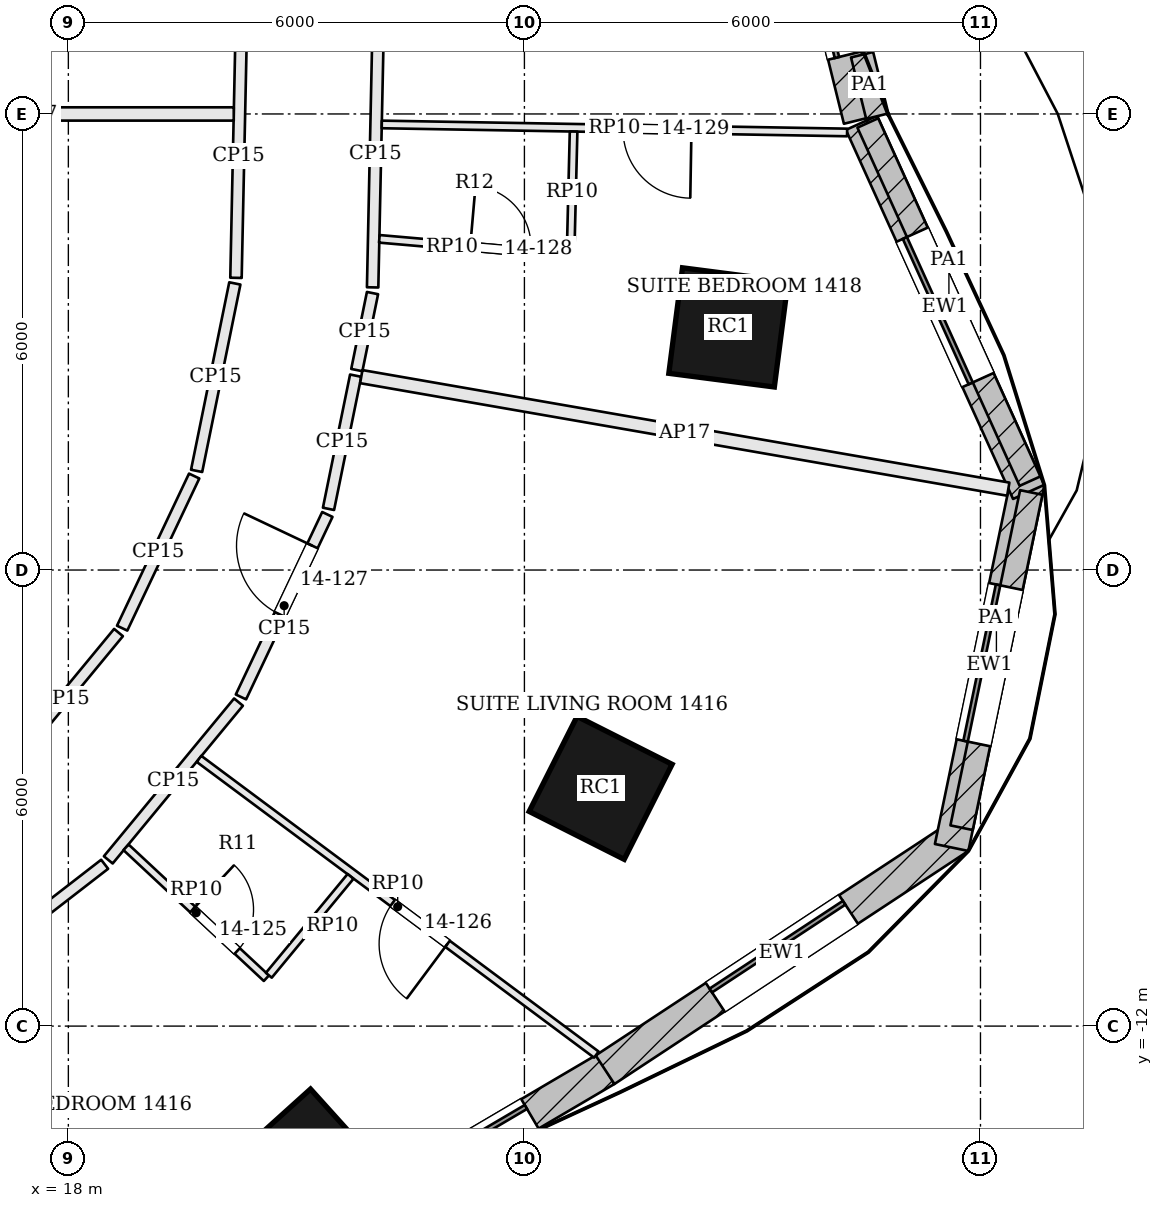
"""IFC4 building model, lengths in metres.
Left out: names, types, materials, properties, quantities, classifications, styles, units other than length and angle.
Written with IfcOpenShell. Run it as: python <this file> out.ifc"""

import sys

from ifc_helpers import new_model, si_unit, direction, frame, frame_2d, origin, origin_2d, place, context, subcontext, project, spatial, rectangle, extrude, element, fill, save


model = new_model("IFC4")
c1 = context("Model", 3, precision=1e-05, world=origin(), true_north=direction((0.0, 1.0)))
c2 = subcontext(c1, "Body", "Model", "MODEL_VIEW")
j1 = project(units=[si_unit("LENGTHUNIT", "METRE"), si_unit("PLANEANGLEUNIT", "RADIAN")], contexts=[c1])
p1 = place(None, origin())
s1 = spatial("IfcSite", under=j1, at=p1, CompositionType="ELEMENT")
p2 = place(p1, origin())
s2 = spatial("IfcBuilding", under=s1, at=p2, CompositionType="ELEMENT")
p3 = place(p2, frame((0.0, 0.0, 66.3)))
s3 = spatial("IfcBuildingStorey", under=s2, at=p3, CompositionType="ELEMENT", Elevation=66.3)
for number, where, z_axis, x_axis in (
    (1, (21.135, -13.817, 0.0), (0.0, 0.0, 1.0), (0.743, 0.67, 0.0)),
    (2, (25.003, -8.866, 0.0), (0.0, 0.0, 1.0), (0.45, 0.893, 0.0)),
    (3, (26.684, -2.808, 0.0), (0.0, 0.0, 1.0), (0.128, 0.992, 0.0)),
):
    element("IfcColumn", number, at=place(p3, frame(where, z_axis=z_axis, x_axis=x_axis)), inside=s3, PredefinedType="COLUMN", context=c2, shape_type="SweptSolid", body=[
        extrude(rectangle(XDim=1.4, YDim=1.4, at=origin_2d()), origin(), (0.0, 0.0, 1.0), 3.6),
    ])
p4 = place(p3, frame((28.422, -0.075, 0.0), z_axis=(0.0, 0.0, 1.0), x_axis=(-0.239809222807, 0.970820033094, 0.0)))
e4 = element("IfcWall", 4, at=p4, inside=s3, PredefinedType="SOLIDWALL", context=c2, shape_type="SweptSolid", body=[
    extrude(rectangle(XDim=3.836, YDim=0.45, at=frame_2d((1.918, 0.0))), origin(), (0.0, 0.0, 1.0), 3.4),
])
p5 = place(p4, frame((0.868, 0.0, 0.9)))
e5 = element("IfcOpeningElement", 5, at=p5, cuts=e4, PredefinedType="OPENING", context=c2, shape_type="SweptSolid", body=[
    extrude(rectangle(XDim=2.1, YDim=2.0, at=frame_2d((1.05, 1.0))), frame((0.0, 0.235, 0.0), z_axis=(0.0, -1.0, 0.0), x_axis=(1.0, 0.0, 0.0)), (0.0, 0.0, 1.0), 0.47),
])
p6 = place(p3, frame((21.266, -14.805, 0.0), z_axis=(0.0, 0.0, 1.0), x_axis=(0.861975457737, 0.506950007653, 0.0)))
e6 = element("IfcWall", 6, at=p6, inside=s3, PredefinedType="SOLIDWALL", context=c2, shape_type="SweptSolid", body=[
    extrude(rectangle(XDim=4.413, YDim=0.45, at=frame_2d((2.207, 0.0))), origin(), (0.0, 0.0, 1.0), 3.4),
])
p7 = place(p6, frame((1.156, 0.0, 0.9)))
e7 = element("IfcOpeningElement", 7, at=p7, cuts=e6, PredefinedType="OPENING", context=c2, shape_type="SweptSolid", body=[
    extrude(rectangle(XDim=2.1, YDim=2.0, at=frame_2d((1.05, 1.0))), frame((0.0, 0.235, 0.0), z_axis=(0.0, -1.0, 0.0), x_axis=(1.0, 0.0, 0.0)), (0.0, 0.0, 1.0), 0.47),
])
p8 = place(p3, frame((25.061, -12.574, 0.0), z_axis=(0.0, 0.0, 1.0), x_axis=(0.83520622102, 0.549936876714, 0.0)))
e8 = element("IfcWall", 8, at=p8, inside=s3, PredefinedType="SOLIDWALL", context=c2, shape_type="SweptSolid", body=[
    extrude(rectangle(XDim=5.57, YDim=0.45, at=frame_2d((2.785, 0.0))), origin(), (0.0, 0.0, 1.0), 3.4),
])
p9 = place(p8, frame((1.735, 0.0, 0.9)))
e9 = element("IfcOpeningElement", 9, at=p9, cuts=e8, PredefinedType="OPENING", context=c2, shape_type="SweptSolid", body=[
    extrude(rectangle(XDim=2.1, YDim=2.0, at=frame_2d((1.05, 1.0))), frame((0.0, 0.235, 0.0), z_axis=(0.0, -1.0, 0.0), x_axis=(1.0, 0.0, 0.0)), (0.0, 0.0, 1.0), 0.47),
])
p10 = place(p3, frame((29.621, -9.65, 0.0), z_axis=(0.0, 0.0, 1.0), x_axis=(0.203505836306, 0.979073732969, 0.0)))
e10 = element("IfcWall", 10, at=p10, inside=s3, PredefinedType="SOLIDWALL", context=c2, shape_type="SweptSolid", body=[
    extrude(rectangle(XDim=4.914, YDim=0.45, at=frame_2d((2.457, 0.0))), origin(), (0.0, 0.0, 1.0), 3.4),
])
p11 = place(p10, frame((1.407, 0.0, 0.9)))
e11 = element("IfcOpeningElement", 11, at=p11, cuts=e10, PredefinedType="OPENING", context=c2, shape_type="SweptSolid", body=[
    extrude(rectangle(XDim=2.1, YDim=2.0, at=frame_2d((1.05, 1.0))), frame((0.0, 0.235, 0.0), z_axis=(0.0, -1.0, 0.0), x_axis=(1.0, 0.0, 0.0)), (0.0, 0.0, 1.0), 0.47),
])
p12 = place(p3, frame((30.634, -4.972, 0.0), z_axis=(0.0, 0.0, 1.0), x_axis=(-0.412494644758, 0.910960025493, 0.0)))
e12 = element("IfcWall", 12, at=p12, inside=s3, PredefinedType="SOLIDWALL", context=c2, shape_type="SweptSolid", body=[
    extrude(rectangle(XDim=5.33, YDim=0.45, at=frame_2d((2.665, 0.0))), origin(), (0.0, 0.0, 1.0), 3.4),
])
p13 = place(p12, frame((1.615, 0.0, 0.9)))
e13 = element("IfcOpeningElement", 13, at=p13, cuts=e12, PredefinedType="OPENING", context=c2, shape_type="SweptSolid", body=[
    extrude(rectangle(XDim=2.1, YDim=2.0, at=frame_2d((1.05, 1.0))), frame((0.0, 0.235, 0.0), z_axis=(0.0, -1.0, 0.0), x_axis=(1.0, 0.0, 0.0)), (0.0, 0.0, 1.0), 0.47),
])
p14 = place(p3, frame((28.642, -0.029, 3.6), z_axis=(0.0, 0.0, 1.0), x_axis=(-0.239775825721, 0.970828282138, 0.0)))
e14 = element("IfcWall", 14, at=p14, inside=s3, PredefinedType="PARAPET", context=c2, shape_type="SweptSolid", body=[
    extrude(rectangle(XDim=0.833, YDim=0.3, at=frame_2d((0.417, 0.0))), origin(), (0.0, 0.0, 1.0), 1.1),
])
p15 = place(p3, frame((29.751, -9.39, 3.6), z_axis=(0.0, 0.0, 1.0), x_axis=(0.203510555438, 0.97907275206, 0.0)))
e15 = element("IfcWall", 15, at=p15, inside=s3, PredefinedType="PARAPET", context=c2, shape_type="SweptSolid", body=[
    extrude(rectangle(XDim=4.505, YDim=0.3, at=frame_2d((2.252, 0.0))), origin(), (0.0, 0.0, 1.0), 1.1),
])
p16 = place(p3, frame((30.652, -4.83, 3.6), z_axis=(0.0, 0.0, 1.0), x_axis=(-0.412522333553, 0.910947487136, 0.0)))
e16 = element("IfcWall", 16, at=p16, inside=s3, PredefinedType="PARAPET", context=c2, shape_type="SweptSolid", body=[
    extrude(rectangle(XDim=5.173, YDim=0.3, at=frame_2d((2.586, 0.0))), origin(), (0.0, 0.0, 1.0), 1.1),
])
p17 = place(p3, frame((18.439, -18.586, 0.0), z_axis=(0.0, 0.0, 1.0), x_axis=(-0.464812403085, 0.885409187855, 0.0)))
e17 = element("IfcWall", 17, at=p17, inside=s3, PredefinedType="PARTITIONING", context=c2, shape_type="SweptSolid", body=[
    extrude(rectangle(XDim=7.123, YDim=0.175, at=frame_2d((3.562, 0.0))), origin(), (0.0, 0.0, 1.0), 2.68),
])
p18 = place(p3, frame((16.221, -11.618, 0.0), z_axis=(0.0, 0.0, 1.0), x_axis=(0.79075977513, 0.612126602948, 0.0)))
e18 = element("IfcWall", 18, at=p18, inside=s3, PredefinedType="PARTITIONING", context=c2, shape_type="SweptSolid", body=[
    extrude(rectangle(XDim=2.854, YDim=0.15, at=frame_2d((1.427, 0.0))), origin(), (0.0, 0.0, 1.0), 2.68),
])
p19 = place(p3, frame((18.525, -9.813, 0.0), z_axis=(0.0, 0.0, 1.0), x_axis=(0.636590727548, 0.771201818981, 0.0)))
e19 = element("IfcWall", 19, at=p19, inside=s3, PredefinedType="PARTITIONING", context=c2, shape_type="SweptSolid", body=[
    extrude(rectangle(XDim=2.691, YDim=0.15, at=frame_2d((1.346, 0.0))), origin(), (0.0, 0.0, 1.0), 2.68),
])
p20 = place(p3, frame((20.271, -7.67, 0.0), z_axis=(0.0, 0.0, 1.0), x_axis=(0.427995478521, 0.903780875193, 0.0)))
e20 = element("IfcWall", 20, at=p20, inside=s3, PredefinedType="PARTITIONING", context=c2, shape_type="SweptSolid", body=[
    extrude(rectangle(XDim=2.656, YDim=0.15, at=frame_2d((1.328, 0.0))), origin(), (0.0, 0.0, 1.0), 2.68),
])
p21 = place(p20, frame((1.2, 0.0, 0.0)))
e21 = element("IfcOpeningElement", 21, at=p21, cuts=e20, PredefinedType="OPENING", context=c2, shape_type="SweptSolid", body=[
    extrude(rectangle(XDim=1.0, YDim=2.1, at=frame_2d((0.5, 1.05))), frame((0.0, 0.085, 0.0), z_axis=(0.0, -1.0, 0.0), x_axis=(1.0, 0.0, 0.0)), (0.0, 0.0, 1.0), 0.17),
])
p22 = place(p3, frame((21.423, -5.195, 0.0), z_axis=(0.0, 0.0, 1.0), x_axis=(0.199711278169, 0.979854787901, 0.0)))
e22 = element("IfcWall", 22, at=p22, inside=s3, PredefinedType="PARTITIONING", context=c2, shape_type="SweptSolid", body=[
    extrude(rectangle(XDim=1.789, YDim=0.15, at=frame_2d((0.894, 0.0))), origin(), (0.0, 0.0, 1.0), 2.68),
])
p23 = place(p3, frame((30.366, -4.936, 0.0), z_axis=(0.0, 0.0, 1.0), x_axis=(-0.98521403611, 0.171328056817, 0.0)))
e23 = element("IfcWall", 23, at=p23, inside=s3, PredefinedType="PARTITIONING", context=c2, shape_type="SweptSolid", body=[
    extrude(rectangle(XDim=8.64, YDim=0.175, at=frame_2d((4.32, 0.0))), origin(), (0.0, 0.0, 1.0), 2.68),
])
p24 = place(p3, frame((21.795, -3.369, 0.0), z_axis=(0.0, 0.0, 1.0), x_axis=(0.199793439504, 0.979838038418, 0.0)))
e24 = element("IfcWall", 24, at=p24, inside=s3, PredefinedType="PARTITIONING", context=c2, shape_type="SweptSolid", body=[
    extrude(rectangle(XDim=1.034, YDim=0.15, at=frame_2d((0.517, 0.0))), origin(), (0.0, 0.0, 1.0), 2.68),
])
p25 = place(p3, frame((22.003, -2.281, 0.0), z_axis=(0.0, 0.0, 1.0), x_axis=(0.021172866829, 0.999775829729, 0.0)))
e25 = element("IfcWall", 25, at=p25, inside=s3, PredefinedType="PARTITIONING", context=c2, shape_type="SweptSolid", body=[
    extrude(rectangle(XDim=3.517, YDim=0.15, at=frame_2d((1.758, 0.0))), origin(), (0.0, 0.0, 1.0), 2.68),
])
p26 = place(p3, frame((20.273, 1.061, 0.0), z_axis=(0.0, 0.0, 1.0), x_axis=(-0.021166906337, -0.99977595594, 0.0)))
e26 = element("IfcWall", 26, at=p26, inside=s3, PredefinedType="PARTITIONING", context=c2, shape_type="SweptSolid", body=[
    extrude(rectangle(XDim=3.218, YDim=0.15, at=frame_2d((1.609, 0.0))), origin(), (0.0, 0.0, 1.0), 2.68),
])
p27 = place(p3, frame((20.19, -2.229, 0.0), z_axis=(0.0, 0.0, 1.0), x_axis=(-0.199752828647, -0.97984631828, 0.0)))
e27 = element("IfcWall", 27, at=p27, inside=s3, PredefinedType="PARTITIONING", context=c2, shape_type="SweptSolid", body=[
    extrude(rectangle(XDim=2.517, YDim=0.15, at=frame_2d((1.258, 0.0))), origin(), (0.0, 0.0, 1.0), 2.68),
])
p28 = place(p3, frame((19.655, -4.763, 0.0), z_axis=(0.0, 0.0, 1.0), x_axis=(-0.427972604023, -0.903791707312, 0.0)))
e28 = element("IfcWall", 28, at=p28, inside=s3, PredefinedType="PARTITIONING", context=c2, shape_type="SweptSolid", body=[
    extrude(rectangle(XDim=2.215, YDim=0.15, at=frame_2d((1.107, 0.0))), origin(), (0.0, 0.0, 1.0), 2.68),
])
p29 = place(p3, frame((18.66, -6.823, 0.0), z_axis=(0.0, 0.0, 1.0), x_axis=(-0.636575205534, -0.771214631409, 0.0)))
e29 = element("IfcWall", 29, at=p29, inside=s3, PredefinedType="PARTITIONING", context=c2, shape_type="SweptSolid", body=[
    extrude(rectangle(XDim=2.267, YDim=0.15, at=frame_2d((1.133, 0.0))), origin(), (0.0, 0.0, 1.0), 2.68),
])
p30 = place(p3, frame((24.946, -12.375, 0.0), z_axis=(0.0, 0.0, 1.0), x_axis=(-0.802211102923, 0.597040489705, 0.0)))
e30 = element("IfcWall", 30, at=p30, inside=s3, PredefinedType="PARTITIONING", context=c2, shape_type="SweptSolid", body=[
    extrude(rectangle(XDim=6.516, YDim=0.1, at=frame_2d((3.258, 0.0))), origin(), (0.0, 0.0, 1.0), 2.68),
])
p31 = place(p30, frame((2.441, 0.0, 0.0)))
e31 = element("IfcOpeningElement", 31, at=p31, cuts=e30, PredefinedType="OPENING", context=c2, shape_type="SweptSolid", body=[
    extrude(rectangle(XDim=0.9, YDim=2.4, at=frame_2d((0.45, 1.2))), frame((0.0, 0.06, 0.0), z_axis=(0.0, -1.0, 0.0), x_axis=(1.0, 0.0, 0.0)), (0.0, 0.0, 1.0), 0.12),
])
p32 = place(p3, frame((18.759, -9.648, 0.0), z_axis=(0.0, 0.0, 1.0), x_axis=(0.731331715945, -0.682021936049, 0.0)))
e32 = element("IfcWall", 32, at=p32, inside=s3, PredefinedType="PARTITIONING", context=c2, shape_type="SweptSolid", body=[
    extrude(rectangle(XDim=2.525, YDim=0.1, at=frame_2d((1.263, 0.0))), origin(), (0.0, 0.0, 1.0), 2.68),
])
p33 = place(p32, frame((1.2, 0.0, 0.0)))
e33 = element("IfcOpeningElement", 33, at=p33, cuts=e32, PredefinedType="OPENING", context=c2, shape_type="SweptSolid", body=[
    extrude(rectangle(XDim=0.8, YDim=2.1, at=frame_2d((0.4, 1.05))), frame((0.0, 0.06, 0.0), z_axis=(0.0, -1.0, 0.0), x_axis=(1.0, 0.0, 0.0)), (0.0, 0.0, 1.0), 0.12),
])
p34 = place(p3, frame((20.637, -11.331, 0.0), z_axis=(0.0, 0.0, 1.0), x_axis=(0.637105732439, 0.770776417447, 0.0)))
e34 = element("IfcWall", 34, at=p34, inside=s3, PredefinedType="PARTITIONING", context=c2, shape_type="SweptSolid", body=[
    extrude(rectangle(XDim=1.688, YDim=0.1, at=frame_2d((0.844, 0.0))), origin(), (0.0, 0.0, 1.0), 2.68),
])
p35 = place(p3, frame((28.245, -0.243, 0.0), z_axis=(0.0, 0.0, 1.0), x_axis=(-0.999851625609, 0.017225758814, 0.0)))
e35 = element("IfcWall", 35, at=p35, inside=s3, PredefinedType="PARTITIONING", context=c2, shape_type="SweptSolid", body=[
    extrude(rectangle(XDim=6.123, YDim=0.1, at=frame_2d((3.062, 0.0))), origin(), (0.0, 0.0, 1.0), 2.68),
])
p36 = place(p35, frame((2.048, 0.0, 0.0)))
e36 = element("IfcOpeningElement", 36, at=p36, cuts=e35, PredefinedType="OPENING", context=c2, shape_type="SweptSolid", body=[
    extrude(rectangle(XDim=0.9, YDim=2.4, at=frame_2d((0.45, 1.2))), frame((0.0, 0.06, 0.0), z_axis=(0.0, -1.0, 0.0), x_axis=(1.0, 0.0, 0.0)), (0.0, 0.0, 1.0), 0.12),
])
p37 = place(p3, frame((22.091, -1.643, 0.0), z_axis=(0.0, 0.0, 1.0), x_axis=(0.996215514387, -0.086917483253, 0.0)))
e37 = element("IfcWall", 37, at=p37, inside=s3, PredefinedType="PARTITIONING", context=c2, shape_type="SweptSolid", body=[
    extrude(rectangle(XDim=2.525, YDim=0.1, at=frame_2d((1.263, 0.0))), origin(), (0.0, 0.0, 1.0), 2.68),
])
p38 = place(p37, frame((1.2, 0.0, 0.0)))
e38 = element("IfcOpeningElement", 38, at=p38, cuts=e37, PredefinedType="OPENING", context=c2, shape_type="SweptSolid", body=[
    extrude(rectangle(XDim=0.8, YDim=2.1, at=frame_2d((0.4, 1.05))), frame((0.0, 0.06, 0.0), z_axis=(0.0, -1.0, 0.0), x_axis=(1.0, 0.0, 0.0)), (0.0, 0.0, 1.0), 0.12),
])
p39 = place(p3, frame((24.608, -1.812, 0.0), z_axis=(0.0, 0.0, 1.0), x_axis=(0.024548584318, 0.999698638094, 0.0)))
e39 = element("IfcWall", 39, at=p39, inside=s3, PredefinedType="PARTITIONING", context=c2, shape_type="SweptSolid", body=[
    extrude(rectangle(XDim=1.581, YDim=0.1, at=frame_2d((0.791, 0.0))), origin(), (0.0, 0.0, 1.0), 2.68),
])
p40 = place(p3, frame((14.875, 0.0, 0.0), z_axis=(0.0, 0.0, 1.0), x_axis=(1.0, 0.0, 0.0)))
e40 = element("IfcWall", 40, at=p40, inside=s3, PredefinedType="PARTITIONING", context=c2, shape_type="SweptSolid", body=[
    extrude(rectangle(XDim=5.301, YDim=0.175, at=frame_2d((2.65, 0.0))), origin(), (0.0, 0.0, 1.0), 2.68),
])
p41 = place(p5, origin())
e41 = element("IfcWindow", 41, at=p41, inside=s3, PartitioningType="SINGLE_PANEL", PredefinedType="WINDOW", context=c2, shape_type="SweptSolid", body=[
    extrude(rectangle(XDim=2.1, YDim=2.0, at=frame_2d((1.05, 1.0))), frame((0.0, 0.135, 0.0), z_axis=(0.0, -1.0, 0.0), x_axis=(1.0, 0.0, 0.0)), (0.0, 0.0, 1.0), 0.06),
])
fill(e5, e41)
p42 = place(p7, origin())
e42 = element("IfcWindow", 42, at=p42, inside=s3, PartitioningType="SINGLE_PANEL", PredefinedType="WINDOW", context=c2, shape_type="SweptSolid", body=[
    extrude(rectangle(XDim=2.1, YDim=2.0, at=frame_2d((1.05, 1.0))), frame((0.0, 0.135, 0.0), z_axis=(0.0, -1.0, 0.0), x_axis=(1.0, 0.0, 0.0)), (0.0, 0.0, 1.0), 0.06),
])
fill(e7, e42)
p43 = place(p9, origin())
e43 = element("IfcWindow", 43, at=p43, inside=s3, PartitioningType="SINGLE_PANEL", PredefinedType="WINDOW", context=c2, shape_type="SweptSolid", body=[
    extrude(rectangle(XDim=2.1, YDim=2.0, at=frame_2d((1.05, 1.0))), frame((0.0, 0.135, 0.0), z_axis=(0.0, -1.0, 0.0), x_axis=(1.0, 0.0, 0.0)), (0.0, 0.0, 1.0), 0.06),
])
fill(e9, e43)
p44 = place(p11, origin())
e44 = element("IfcWindow", 44, at=p44, inside=s3, PartitioningType="SINGLE_PANEL", PredefinedType="WINDOW", context=c2, shape_type="SweptSolid", body=[
    extrude(rectangle(XDim=2.1, YDim=2.0, at=frame_2d((1.05, 1.0))), frame((0.0, 0.135, 0.0), z_axis=(0.0, -1.0, 0.0), x_axis=(1.0, 0.0, 0.0)), (0.0, 0.0, 1.0), 0.06),
])
fill(e11, e44)
p45 = place(p13, origin())
e45 = element("IfcWindow", 45, at=p45, inside=s3, PartitioningType="SINGLE_PANEL", PredefinedType="WINDOW", context=c2, shape_type="SweptSolid", body=[
    extrude(rectangle(XDim=2.1, YDim=2.0, at=frame_2d((1.05, 1.0))), frame((0.0, 0.135, 0.0), z_axis=(0.0, -1.0, 0.0), x_axis=(1.0, 0.0, 0.0)), (0.0, 0.0, 1.0), 0.06),
])
fill(e13, e45)
p46 = place(p33, origin())
e46 = element("IfcDoor", 46, at=p46, inside=s3, OperationType="SINGLE_SWING_LEFT", PredefinedType="DOOR", context=c2, shape_type="SweptSolid", body=[
    extrude(rectangle(XDim=0.8, YDim=2.1, at=frame_2d((0.4, 1.05))), frame((0.0, 0.025, 0.0), z_axis=(0.0, -1.0, 0.0), x_axis=(1.0, 0.0, 0.0)), (0.0, 0.0, 1.0), 0.05),
])
fill(e33, e46)
p47 = place(p31, origin())
e47 = element("IfcDoor", 47, at=p47, inside=s3, OperationType="SINGLE_SWING_LEFT", PredefinedType="DOOR", context=c2, shape_type="SweptSolid", body=[
    extrude(rectangle(XDim=0.9, YDim=2.4, at=frame_2d((0.45, 1.2))), frame((0.0, 0.025, 0.0), z_axis=(0.0, -1.0, 0.0), x_axis=(1.0, 0.0, 0.0)), (0.0, 0.0, 1.0), 0.05),
])
fill(e31, e47)
p48 = place(p21, origin())
e48 = element("IfcDoor", 48, at=p48, inside=s3, OperationType="SINGLE_SWING_RIGHT", PredefinedType="DOOR", context=c2, shape_type="SweptSolid", body=[
    extrude(rectangle(XDim=1.0, YDim=2.1, at=frame_2d((0.5, 1.05))), frame((0.0, 0.025, 0.0), z_axis=(0.0, -1.0, 0.0), x_axis=(1.0, 0.0, 0.0)), (0.0, 0.0, 1.0), 0.05),
])
fill(e21, e48)
p49 = place(p38, origin())
e49 = element("IfcDoor", 49, at=p49, inside=s3, OperationType="SINGLE_SWING_LEFT", PredefinedType="DOOR", context=c2, shape_type="SweptSolid", body=[
    extrude(rectangle(XDim=0.8, YDim=2.1, at=frame_2d((0.4, 1.05))), frame((0.0, 0.025, 0.0), z_axis=(0.0, -1.0, 0.0), x_axis=(1.0, 0.0, 0.0)), (0.0, 0.0, 1.0), 0.05),
])
fill(e38, e49)
p50 = place(p36, origin())
e50 = element("IfcDoor", 50, at=p50, inside=s3, OperationType="SINGLE_SWING_LEFT", PredefinedType="DOOR", context=c2, shape_type="SweptSolid", body=[
    extrude(rectangle(XDim=0.9, YDim=2.4, at=frame_2d((0.45, 1.2))), frame((0.0, 0.025, 0.0), z_axis=(0.0, -1.0, 0.0), x_axis=(1.0, 0.0, 0.0)), (0.0, 0.0, 1.0), 0.05),
])
fill(e36, e50)
save(model, sys.argv[1])
